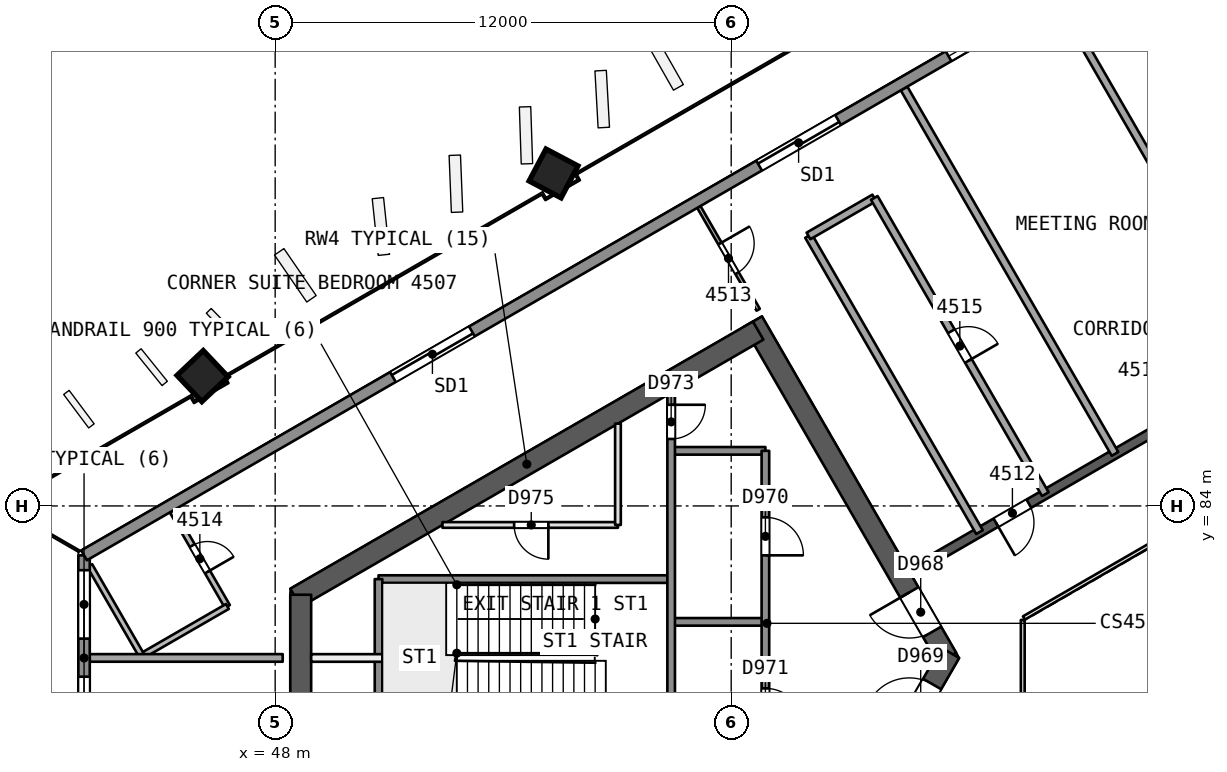
"""IFC4 building model, lengths in metres.
Left out: names, types, materials, properties, quantities, classifications, styles, units other than length and angle.
Written with IfcOpenShell. Run it as: python <this file> out.ifc"""

import sys

from ifc_helpers import new_model, si_unit, direction, frame, frame_2d, origin, origin_2d, place, context, subcontext, project, spatial, rectangle, extrude, element, fill, save


model = new_model("IFC4")
c1 = context("Model", 3, precision=1e-05, world=origin(), true_north=direction((0.0, 1.0)))
c2 = subcontext(c1, "Body", "Model", "MODEL_VIEW")
j1 = project(units=[si_unit("LENGTHUNIT", "METRE"), si_unit("PLANEANGLEUNIT", "RADIAN")], contexts=[c1])
p1 = place(None, origin())
s1 = spatial("IfcSite", under=j1, at=p1, CompositionType="ELEMENT")
p2 = place(p1, origin())
s2 = spatial("IfcBuilding", under=s1, at=p2, CompositionType="ELEMENT")
p3 = place(p2, frame((0.0, 0.0, 185.9)))
s3 = spatial("IfcBuildingStorey", under=s2, at=p3, CompositionType="ELEMENT", Elevation=185.9)
p4 = place(p3, frame((65.682, 80.0, 0.0), z_axis=(0.0, 0.0, 1.0), x_axis=(-0.500000202252, 0.866025287014, 0.0)))
e1 = element("IfcWall", 1, at=p4, inside=s3, PredefinedType="SHEAR", context=c2, shape_type="SweptSolid", body=[
    extrude(rectangle(XDim=10.221, YDim=0.55, at=frame_2d((5.111, 0.0))), origin(), (0.0, 0.0, 1.0), 3.7),
])
p5 = place(p4, frame((0.791, 0.0, 0.0)))
e2 = element("IfcOpeningElement", 2, at=p5, cuts=e1, PredefinedType="OPENING", context=c2, shape_type="SweptSolid", body=[
    extrude(rectangle(XDim=1.2, YDim=2.1, at=frame_2d((0.6, 1.05))), frame((0.0, 0.286, 0.0), z_axis=(0.0, -1.0, 0.0), x_axis=(1.0, 0.0, 0.0)), (0.0, 0.0, 1.0), 0.571),
])
p6 = place(p3, frame((60.709, 88.614, 0.0), z_axis=(0.0, 0.0, 1.0), x_axis=(-0.866020164116, -0.500009075263, 0.0)))
e3 = element("IfcWall", 3, at=p6, inside=s3, PredefinedType="SHEAR", context=c2, shape_type="SweptSolid", body=[
    extrude(rectangle(XDim=14.058, YDim=0.55, at=frame_2d((7.029, 0.0))), origin(), (0.0, 0.0, 1.0), 3.7),
])
p7 = place(p3, frame((48.672, 81.664, 0.0), z_axis=(0.0, 0.0, 1.0), x_axis=(0.0, -1.0, 0.0)))
e4 = element("IfcWall", 4, at=p7, inside=s3, PredefinedType="SHEAR", context=c2, shape_type="SweptSolid", body=[
    extrude(rectangle(XDim=3.487, YDim=0.55, at=frame_2d((1.743, 0.0))), origin(), (0.0, 0.0, 1.0), 3.7),
])
p8 = place(p3, frame((60.709, 71.386, 0.0), z_axis=(0.0, 0.0, 1.0), x_axis=(0.500015938302, 0.866016201606, 0.0)))
e5 = element("IfcWall", 5, at=p8, inside=s3, PredefinedType="SHEAR", context=c2, shape_type="SweptSolid", body=[
    extrude(rectangle(XDim=10.105, YDim=0.55, at=frame_2d((5.053, 0.0))), origin(), (0.0, 0.0, 1.0), 3.7),
])
p9 = place(p8, frame((7.955, 0.0, 0.0)))
e6 = element("IfcOpeningElement", 6, at=p9, cuts=e5, PredefinedType="OPENING", context=c2, shape_type="SweptSolid", body=[
    extrude(rectangle(XDim=1.2, YDim=2.1, at=frame_2d((0.6, 1.05))), frame((0.0, 0.286, 0.0), z_axis=(0.0, -1.0, 0.0), x_axis=(1.0, 0.0, 0.0)), (0.0, 0.0, 1.0), 0.571),
])
p10 = place(p3, frame((78.2, 90.046, 0.0), z_axis=(0.0, 0.0, 1.0), x_axis=(-0.866026492143, -0.499998114903, 0.0)))
e7 = element("IfcWall", 7, at=p10, inside=s3, PredefinedType="SHEAR", context=c2, shape_type="SweptSolid", body=[
    extrude(rectangle(XDim=15.588, YDim=0.25, at=frame_2d((7.794, 0.0))), origin(), (0.0, 0.0, 1.0), 3.25),
])
p11 = place(p10, frame((3.138, 0.0, 0.0)))
e8 = element("IfcOpeningElement", 8, at=p11, cuts=e7, PredefinedType="OPENING", context=c2, shape_type="SweptSolid", body=[
    extrude(rectangle(XDim=1.0, YDim=2.1, at=frame_2d((0.5, 1.05))), frame((0.0, 0.135, 0.0), z_axis=(0.0, -1.0, 0.0), x_axis=(1.0, 0.0, 0.0)), (0.0, 0.0, 1.0), 0.271),
])
p12 = place(p10, frame((6.415, 0.0, 0.0)))
e9 = element("IfcOpeningElement", 9, at=p12, cuts=e7, PredefinedType="OPENING", context=c2, shape_type="SweptSolid", body=[
    extrude(rectangle(XDim=1.2, YDim=2.4, at=frame_2d((0.6, 1.2))), frame((0.0, 0.135, 0.0), z_axis=(0.0, -1.0, 0.0), x_axis=(1.0, 0.0, 0.0)), (0.0, 0.0, 1.0), 0.271),
])
p13 = place(p10, frame((11.971, 0.0, 0.0)))
e10 = element("IfcOpeningElement", 10, at=p13, cuts=e7, PredefinedType="OPENING", context=c2, shape_type="SweptSolid", body=[
    extrude(rectangle(XDim=1.0, YDim=2.1, at=frame_2d((0.5, 1.05))), frame((0.0, 0.135, 0.0), z_axis=(0.0, -1.0, 0.0), x_axis=(1.0, 0.0, 0.0)), (0.0, 0.0, 1.0), 0.271),
])
p14 = place(p3, frame((55.302, 92.763, 0.0), z_axis=(0.019327242333, -0.012137244332, 0.999739538582), x_axis=(-0.500214328423, 0.865666448646, 0.020179824807)))
e11 = element("IfcColumn", 11, at=p14, inside=s3, PredefinedType="COLUMN", context=c2, shape_type="SweptSolid", body=[
    extrude(rectangle(XDim=0.95, YDim=0.95, at=origin_2d()), origin(), (0.0, 0.0, 1.0), 3.701),
])
p15 = place(p3, frame((46.055, 87.425, 0.0), z_axis=(0.028557219273, -0.006859008786, 0.999568626571), x_axis=(-0.498515256127, 0.866645794777, 0.020189249707)))
e12 = element("IfcColumn", 12, at=p15, inside=s3, PredefinedType="COLUMN", context=c2, shape_type="SweptSolid", body=[
    extrude(rectangle(XDim=0.95, YDim=0.95, at=origin_2d()), origin(), (0.0, 0.0, 1.0), 3.702),
])
for number, where, z_axis, x_axis in (
    (13, (68.598, 97.323, 0.0), (0.0, 0.0, 1.0), (0.5, -0.866, 0.0)),
    (14, (64.548, 94.985, 0.0), (0.0, 0.0, 1.0), (0.5, -0.866, 0.0)),
):
    element("IfcWall", number, at=place(p3, frame(where, z_axis=z_axis, x_axis=x_axis)), inside=s3, PredefinedType="PARTITIONING", context=c2, shape_type="SweptSolid", body=[
        extrude(rectangle(XDim=11.104, YDim=0.2, at=frame_2d((5.552, 0.0))), origin(), (0.0, 0.0, 1.0), 3.25),
    ])
p16 = place(p3, frame((59.148, 91.868, 0.0), z_axis=(0.0, 0.0, 1.0), x_axis=(0.4999794672, -0.866037258078, 0.0)))
e15 = element("IfcWall", 15, at=p16, inside=s3, PredefinedType="PARTITIONING", context=c2, shape_type="SweptSolid", body=[
    extrude(rectangle(XDim=3.125, YDim=0.1, at=frame_2d((1.562, 0.0))), origin(), (0.0, 0.0, 1.0), 3.25),
])
p17 = place(p16, frame((1.112, 0.0, 0.0)))
e16 = element("IfcOpeningElement", 16, at=p17, cuts=e15, PredefinedType="OPENING", context=c2, shape_type="SweptSolid", body=[
    extrude(rectangle(XDim=0.9, YDim=2.1, at=frame_2d((0.45, 1.05))), frame((0.0, 0.061, 0.0), z_axis=(0.0, -1.0, 0.0), x_axis=(1.0, 0.0, 0.0)), (0.0, 0.0, 1.0), 0.121),
])
p18 = place(p3, frame((66.534, 83.311, 0.0), z_axis=(0.0, 0.0, 1.0), x_axis=(-0.5000018851, 0.866024315419, 0.0)))
e17 = element("IfcWall", 17, at=p18, inside=s3, PredefinedType="PARTITIONING", context=c2, shape_type="SweptSolid", body=[
    extrude(rectangle(XDim=9.0, YDim=0.2, at=frame_2d((4.5, 0.0))), origin(), (0.0, 0.0, 1.0), 3.25),
])
p19 = place(p3, frame((62.034, 91.105, 0.0), z_axis=(0.0, 0.0, 1.0), x_axis=(0.866041268327, 0.499972520799, 0.0)))
e18 = element("IfcWall", 18, at=p19, inside=s3, PredefinedType="PARTITIONING", context=c2, shape_type="SweptSolid", body=[
    extrude(rectangle(XDim=2.0, YDim=0.2, at=frame_2d((1.0, 0.0))), origin(), (0.0, 0.0, 1.0), 3.25),
])
p20 = place(p3, frame((63.766, 92.105, 0.0), z_axis=(0.0, 0.0, 1.0), x_axis=(0.5000018851, -0.866024315419, 0.0)))
e19 = element("IfcWall", 19, at=p20, inside=s3, PredefinedType="PARTITIONING", context=c2, shape_type="SweptSolid", body=[
    extrude(rectangle(XDim=9.0, YDim=0.2, at=frame_2d((4.5, 0.0))), origin(), (0.0, 0.0, 1.0), 3.25),
])
p21 = place(p20, frame((4.05, 0.0, 0.0)))
e20 = element("IfcOpeningElement", 20, at=p21, cuts=e19, PredefinedType="OPENING", context=c2, shape_type="SweptSolid", body=[
    extrude(rectangle(XDim=0.9, YDim=2.1, at=frame_2d((0.45, 1.05))), frame((0.0, 0.11, 0.0), z_axis=(0.0, -1.0, 0.0), x_axis=(1.0, 0.0, 0.0)), (0.0, 0.0, 1.0), 0.221),
])
p22 = place(p3, frame((45.293, 83.866, 0.0), z_axis=(0.0, 0.0, 1.0), x_axis=(0.50005036918, -0.865996321171, 0.0)))
e21 = element("IfcWall", 21, at=p22, inside=s3, PredefinedType="PARTITIONING", context=c2, shape_type="SweptSolid", body=[
    extrude(rectangle(XDim=2.9, YDim=0.15, at=frame_2d((1.45, 0.0))), origin(), (0.0, 0.0, 1.0), 3.25),
])
p23 = place(p22, frame((1.05, 0.0, 0.0)))
e22 = element("IfcOpeningElement", 22, at=p23, cuts=e21, PredefinedType="OPENING", context=c2, shape_type="SweptSolid", body=[
    extrude(rectangle(XDim=0.8, YDim=2.1, at=frame_2d((0.4, 1.05))), frame((0.0, 0.085, 0.0), z_axis=(0.0, -1.0, 0.0), x_axis=(1.0, 0.0, 0.0)), (0.0, 0.0, 1.0), 0.171),
])
p24 = place(p3, frame((46.743, 81.354, 0.0), z_axis=(0.0, 0.0, 1.0), x_axis=(-0.866021400173, -0.500006934395, 0.0)))
e23 = element("IfcWall", 23, at=p24, inside=s3, PredefinedType="PARTITIONING", context=c2, shape_type="SweptSolid", body=[
    extrude(rectangle(XDim=2.6, YDim=0.15, at=frame_2d((1.3, 0.0))), origin(), (0.0, 0.0, 1.0), 3.25),
])
p25 = place(p3, frame((44.491, 80.054, 0.0), z_axis=(0.0, 0.0, 1.0), x_axis=(-0.500035825175, 0.866004719122, 0.0)))
e24 = element("IfcWall", 24, at=p25, inside=s3, PredefinedType="PARTITIONING", context=c2, shape_type="SweptSolid", body=[
    extrude(rectangle(XDim=2.742, YDim=0.15, at=frame_2d((1.371, 0.0))), origin(), (0.0, 0.0, 1.0), 3.25),
])
p26 = place(p3, frame((43.12, 80.001, 0.0), z_axis=(0.0, 0.0, 1.0), x_axis=(1.0, 0.0, 0.0)))
e25 = element("IfcWall", 25, at=p26, inside=s3, PredefinedType="PARTITIONING", context=c2, shape_type="SweptSolid", body=[
    extrude(rectangle(XDim=5.078, YDim=0.2, at=frame_2d((2.539, 0.0))), origin(), (0.0, 0.0, 1.0), 3.25),
])
p27 = place(p3, frame((42.971, 77.3, 0.0), z_axis=(0.0, 0.0, 1.0), x_axis=(0.0, 1.0, 0.0)))
e26 = element("IfcWall", 26, at=p27, inside=s3, PredefinedType="SOLIDWALL", context=c2, shape_type="SweptSolid", body=[
    extrude(rectangle(XDim=5.399, YDim=0.3, at=frame_2d((2.7, 0.0))), origin(), (0.0, 0.0, 1.0), 3.25),
])
p28 = place(p27, frame((3.209, 0.0, 0.9)))
e27 = element("IfcOpeningElement", 27, at=p28, cuts=e26, PredefinedType="OPENING", context=c2, shape_type="SweptSolid", body=[
    extrude(rectangle(XDim=1.8, YDim=1.5, at=frame_2d((0.9, 0.75))), frame((0.0, 0.161, 0.0), z_axis=(0.0, -1.0, 0.0), x_axis=(1.0, 0.0, 0.0)), (0.0, 0.0, 1.0), 0.321),
])
p29 = place(p27, frame((0.407, 0.0, 0.9)))
e28 = element("IfcOpeningElement", 28, at=p29, cuts=e26, PredefinedType="OPENING", context=c2, shape_type="SweptSolid", body=[
    extrude(rectangle(XDim=1.8, YDim=1.5, at=frame_2d((0.9, 0.75))), frame((0.0, 0.161, 0.0), z_axis=(0.0, -1.0, 0.0), x_axis=(1.0, 0.0, 0.0)), (0.0, 0.0, 1.0), 0.321),
])
p30 = place(p3, frame((42.971, 82.7, 0.0), z_axis=(0.0, 0.0, 1.0), x_axis=(0.866024890781, 0.500000888547, 0.0)))
e29 = element("IfcWall", 29, at=p30, inside=s3, PredefinedType="SOLIDWALL", context=c2, shape_type="SweptSolid", body=[
    extrude(rectangle(XDim=52.776, YDim=0.3, at=frame_2d((26.388, 0.0))), origin(), (0.0, 0.0, 1.0), 3.25),
])
p31 = place(p30, frame((20.511, 0.0, 0.0)))
e30 = element("IfcOpeningElement", 30, at=p31, cuts=e29, PredefinedType="OPENING", context=c2, shape_type="SweptSolid", body=[
    extrude(rectangle(XDim=2.4, YDim=2.4, at=frame_2d((1.2, 1.2))), frame((0.0, 0.161, 0.0), z_axis=(0.0, -1.0, 0.0), x_axis=(1.0, 0.0, 0.0)), (0.0, 0.0, 1.0), 0.321),
])
p32 = place(p30, frame((9.385, 0.0, 0.0)))
e31 = element("IfcOpeningElement", 31, at=p32, cuts=e29, PredefinedType="OPENING", context=c2, shape_type="SweptSolid", body=[
    extrude(rectangle(XDim=2.4, YDim=2.4, at=frame_2d((1.2, 1.2))), frame((0.0, 0.161, 0.0), z_axis=(0.0, -1.0, 0.0), x_axis=(1.0, 0.0, 0.0)), (0.0, 0.0, 1.0), 0.321),
])
p33 = place(p30, frame((39.984, 0.0, 0.0)))
e32 = element("IfcOpeningElement", 32, at=p33, cuts=e29, PredefinedType="OPENING", context=c2, shape_type="SweptSolid", body=[
    extrude(rectangle(XDim=2.4, YDim=2.4, at=frame_2d((1.2, 1.2))), frame((0.0, 0.161, 0.0), z_axis=(0.0, -1.0, 0.0), x_axis=(1.0, 0.0, 0.0)), (0.0, 0.0, 1.0), 0.321),
])
p34 = place(p30, frame((26.268, 0.0, 0.9)))
e33 = element("IfcOpeningElement", 33, at=p34, cuts=e29, PredefinedType="OPENING", context=c2, shape_type="SweptSolid", body=[
    extrude(rectangle(XDim=1.8, YDim=1.5, at=frame_2d((0.9, 0.75))), frame((0.0, 0.161, 0.0), z_axis=(0.0, -1.0, 0.0), x_axis=(1.0, 0.0, 0.0)), (0.0, 0.0, 1.0), 0.321),
])
p35 = place(p3, frame((60.9, 85.45, 0.0), z_axis=(0.0, 0.0, 1.0), x_axis=(-1.0, 0.0, 0.0)))
e34 = element("IfcWall", 34, at=p35, inside=s3, PredefinedType="SOLIDWALL", context=c2, shape_type="SweptSolid", body=[
    extrude(rectangle(XDim=2.48, YDim=0.2, at=frame_2d((1.24, 0.0))), origin(), (0.0, 0.0, 1.0), 3.25),
])
p36 = place(p3, frame((57.02, 83.5, 0.0), z_axis=(0.0, 0.0, 1.0), x_axis=(-1.0, 0.0, 0.0)))
e35 = element("IfcWall", 35, at=p36, inside=s3, PredefinedType="PARTITIONING", context=c2, shape_type="SweptSolid", body=[
    extrude(rectangle(XDim=4.618, YDim=0.15, at=frame_2d((2.309, 0.0))), origin(), (0.0, 0.0, 1.0), 3.25),
])
p37 = place(p36, frame((1.832, 0.0, 0.0)))
e36 = element("IfcOpeningElement", 36, at=p37, cuts=e35, PredefinedType="OPENING", context=c2, shape_type="SweptSolid", body=[
    extrude(rectangle(XDim=0.9, YDim=2.1, at=frame_2d((0.45, 1.05))), frame((0.0, 0.085, 0.0), z_axis=(0.0, -1.0, 0.0), x_axis=(1.0, 0.0, 0.0)), (0.0, 0.0, 1.0), 0.171),
])
p38 = place(p3, frame((58.42, 82.075, 0.0), z_axis=(0.0, 0.0, 1.0), x_axis=(-1.0, 0.0, 0.0)))
e37 = element("IfcWall", 37, at=p38, inside=s3, PredefinedType="SOLIDWALL", context=c2, shape_type="SweptSolid", body=[
    extrude(rectangle(XDim=7.7, YDim=0.2, at=frame_2d((3.85, 0.0))), origin(), (0.0, 0.0, 1.0), 3.25),
])
p39 = place(p3, frame((60.9, 80.95, 0.0), z_axis=(0.0, 0.0, 1.0), x_axis=(-1.0, 0.0, 0.0)))
e38 = element("IfcWall", 38, at=p39, inside=s3, PredefinedType="SOLIDWALL", context=c2, shape_type="SweptSolid", body=[
    extrude(rectangle(XDim=2.48, YDim=0.2, at=frame_2d((1.24, 0.0))), origin(), (0.0, 0.0, 1.0), 3.25),
])
p40 = place(p3, frame((50.82, 80.0, 0.0), z_axis=(0.0, 0.0, 1.0), x_axis=(-1.0, 0.0, 0.0)))
e39 = element("IfcWall", 39, at=p40, inside=s3, PredefinedType="PARTITIONING", context=c2, shape_type="SweptSolid", body=[
    extrude(rectangle(XDim=1.873, YDim=0.2, at=frame_2d((0.937, 0.0))), origin(), (0.0, 0.0, 1.0), 3.25),
])
p41 = place(p3, frame((60.9, 85.45, 0.0), z_axis=(0.0, 0.0, 1.0), x_axis=(0.0, -1.0, 0.0)))
e40 = element("IfcWall", 40, at=p41, inside=s3, PredefinedType="SOLIDWALL", context=c2, shape_type="SweptSolid", body=[
    extrude(rectangle(XDim=10.9, YDim=0.2, at=frame_2d((5.45, 0.0))), origin(), (0.0, 0.0, 1.0), 3.25),
])
p42 = place(p41, frame((1.75, 0.0, 0.0)))
e41 = element("IfcOpeningElement", 41, at=p42, cuts=e40, PredefinedType="OPENING", context=c2, shape_type="SweptSolid", body=[
    extrude(rectangle(XDim=1.0, YDim=2.1, at=frame_2d((0.5, 1.05))), frame((0.0, 0.11, 0.0), z_axis=(0.0, -1.0, 0.0), x_axis=(1.0, 0.0, 0.0)), (0.0, 0.0, 1.0), 0.221),
])
p43 = place(p41, frame((6.25, 0.0, 0.0)))
e42 = element("IfcOpeningElement", 42, at=p43, cuts=e40, PredefinedType="OPENING", context=c2, shape_type="SweptSolid", body=[
    extrude(rectangle(XDim=1.0, YDim=2.1, at=frame_2d((0.5, 1.05))), frame((0.0, 0.11, 0.0), z_axis=(0.0, -1.0, 0.0), x_axis=(1.0, 0.0, 0.0)), (0.0, 0.0, 1.0), 0.221),
])
p44 = place(p3, frame((58.42, 86.974, 0.0), z_axis=(0.0, 0.0, 1.0), x_axis=(0.0, -1.0, 0.0)))
e43 = element("IfcWall", 43, at=p44, inside=s3, PredefinedType="SOLIDWALL", context=c2, shape_type="SweptSolid", body=[
    extrude(rectangle(XDim=10.524, YDim=0.2, at=frame_2d((5.262, 0.0))), origin(), (0.0, 0.0, 1.0), 3.25),
])
p45 = place(p44, frame((0.312, 0.0, 0.0)))
e44 = element("IfcOpeningElement", 44, at=p45, cuts=e43, PredefinedType="OPENING", context=c2, shape_type="SweptSolid", body=[
    extrude(rectangle(XDim=0.9, YDim=2.1, at=frame_2d((0.45, 1.05))), frame((0.0, 0.11, 0.0), z_axis=(0.0, -1.0, 0.0), x_axis=(1.0, 0.0, 0.0)), (0.0, 0.0, 1.0), 0.221),
])
p46 = place(p3, frame((57.02, 86.166, 0.0), z_axis=(0.0, 0.0, 1.0), x_axis=(0.0, -1.0, 0.0)))
e45 = element("IfcWall", 45, at=p46, inside=s3, PredefinedType="PARTITIONING", context=c2, shape_type="SweptSolid", body=[
    extrude(rectangle(XDim=2.666, YDim=0.15, at=frame_2d((1.333, 0.0))), origin(), (0.0, 0.0, 1.0), 3.25),
])
p47 = place(p3, frame((50.72, 82.075, 0.0), z_axis=(0.0, 0.0, 1.0), x_axis=(0.0, -1.0, 0.0)))
e46 = element("IfcWall", 46, at=p47, inside=s3, PredefinedType="SOLIDWALL", context=c2, shape_type="SweptSolid", body=[
    extrude(rectangle(XDim=4.15, YDim=0.2, at=frame_2d((2.075, 0.0))), origin(), (0.0, 0.0, 1.0), 3.25),
])
p48 = place(p3, frame((77.738, 86.846, 0.0), z_axis=(0.0, 0.0, 1.0), x_axis=(-0.866026658274, -0.499997827154, 0.0)))
e47 = element("IfcWall", 47, at=p48, inside=s3, PredefinedType="PARTITIONING", context=c2, shape_type="SweptSolid", body=[
    extrude(rectangle(XDim=11.588, YDim=0.1, at=frame_2d((5.794, 0.0))), origin(), (0.0, 0.0, 1.0), 3.25),
])
p49 = place(p3, frame((67.672, 81.0, 0.0), z_axis=(0.0, 0.0, 1.0), x_axis=(0.0, -1.0, 0.0)))
e48 = element("IfcWall", 48, at=p49, inside=s3, PredefinedType="PARTITIONING", context=c2, shape_type="SweptSolid", body=[
    extrude(rectangle(XDim=2.0, YDim=0.1, at=frame_2d((1.0, 0.0))), origin(), (0.0, 0.0, 1.0), 3.25),
])
p50 = place(p13, origin())
e49 = element("IfcDoor", 49, at=p50, inside=s3, OperationType="SINGLE_SWING_RIGHT", PredefinedType="NOTDEFINED", context=c2, shape_type="SweptSolid", body=[
    extrude(rectangle(XDim=1.0, YDim=2.1, at=frame_2d((0.5, 1.05))), frame((0.0, 0.025, 0.0), z_axis=(0.0, -1.0, 0.0), x_axis=(1.0, 0.0, 0.0)), (0.0, 0.0, 1.0), 0.05),
])
fill(e10, e49)
p51 = place(p17, origin())
e50 = element("IfcDoor", 50, at=p51, inside=s3, OperationType="SINGLE_SWING_LEFT", PredefinedType="NOTDEFINED", context=c2, shape_type="SweptSolid", body=[
    extrude(rectangle(XDim=0.9, YDim=2.1, at=frame_2d((0.45, 1.05))), frame((0.0, 0.025, 0.0), z_axis=(0.0, -1.0, 0.0), x_axis=(1.0, 0.0, 0.0)), (0.0, 0.0, 1.0), 0.05),
])
fill(e16, e50)
p52 = place(p23, origin())
e51 = element("IfcDoor", 51, at=p52, inside=s3, OperationType="SINGLE_SWING_RIGHT", PredefinedType="NOTDEFINED", context=c2, shape_type="SweptSolid", body=[
    extrude(rectangle(XDim=0.8, YDim=2.1, at=frame_2d((0.4, 1.05))), frame((0.0, 0.025, 0.0), z_axis=(0.0, -1.0, 0.0), x_axis=(1.0, 0.0, 0.0)), (0.0, 0.0, 1.0), 0.05),
])
fill(e22, e51)
p53 = place(p21, origin())
e52 = element("IfcDoor", 52, at=p53, inside=s3, OperationType="SINGLE_SWING_RIGHT", PredefinedType="NOTDEFINED", context=c2, shape_type="SweptSolid", body=[
    extrude(rectangle(XDim=0.9, YDim=2.1, at=frame_2d((0.45, 1.05))), frame((0.0, 0.025, 0.0), z_axis=(0.0, -1.0, 0.0), x_axis=(1.0, 0.0, 0.0)), (0.0, 0.0, 1.0), 0.05),
])
fill(e20, e52)
p54 = place(p28, origin())
e53 = element("IfcWindow", 53, at=p54, inside=s3, PartitioningType="SINGLE_PANEL", PredefinedType="WINDOW", context=c2, shape_type="SweptSolid", body=[
    extrude(rectangle(XDim=1.8, YDim=1.5, at=frame_2d((0.9, 0.75))), frame((0.0, 0.03, 0.0), z_axis=(0.0, -1.0, 0.0), x_axis=(1.0, 0.0, 0.0)), (0.0, 0.0, 1.0), 0.06),
])
fill(e27, e53)
p55 = place(p29, origin())
e54 = element("IfcWindow", 54, at=p55, inside=s3, PartitioningType="SINGLE_PANEL", PredefinedType="WINDOW", context=c2, shape_type="SweptSolid", body=[
    extrude(rectangle(XDim=1.8, YDim=1.5, at=frame_2d((0.9, 0.75))), frame((0.0, 0.03, 0.0), z_axis=(0.0, -1.0, 0.0), x_axis=(1.0, 0.0, 0.0)), (0.0, 0.0, 1.0), 0.06),
])
fill(e28, e54)
p56 = place(p31, origin())
e55 = element("IfcDoor", 55, at=p56, inside=s3, OperationType="SLIDING_TO_LEFT", PredefinedType="NOTDEFINED", context=c2, shape_type="SweptSolid", body=[
    extrude(rectangle(XDim=2.4, YDim=2.4, at=frame_2d((1.2, 1.2))), frame((0.0, 0.025, 0.0), z_axis=(0.0, -1.0, 0.0), x_axis=(1.0, 0.0, 0.0)), (0.0, 0.0, 1.0), 0.05),
])
fill(e30, e55)
p57 = place(p32, origin())
e56 = element("IfcDoor", 56, at=p57, inside=s3, OperationType="SLIDING_TO_RIGHT", PredefinedType="NOTDEFINED", context=c2, shape_type="SweptSolid", body=[
    extrude(rectangle(XDim=2.4, YDim=2.4, at=frame_2d((1.2, 1.2))), frame((0.0, 0.025, 0.0), z_axis=(0.0, -1.0, 0.0), x_axis=(1.0, 0.0, 0.0)), (0.0, 0.0, 1.0), 0.05),
])
fill(e31, e56)
p58 = place(p34, origin())
e57 = element("IfcWindow", 57, at=p58, inside=s3, PartitioningType="SINGLE_PANEL", PredefinedType="WINDOW", context=c2, shape_type="SweptSolid", body=[
    extrude(rectangle(XDim=1.8, YDim=1.5, at=frame_2d((0.9, 0.75))), frame((0.0, 0.03, 0.0), z_axis=(0.0, -1.0, 0.0), x_axis=(1.0, 0.0, 0.0)), (0.0, 0.0, 1.0), 0.06),
])
fill(e33, e57)
p59 = place(p5, origin())
e58 = element("IfcDoor", 58, at=p59, inside=s3, OperationType="SINGLE_SWING_RIGHT", PredefinedType="NOTDEFINED", context=c2, shape_type="SweptSolid", body=[
    extrude(rectangle(XDim=1.2, YDim=2.1, at=frame_2d((0.6, 1.05))), frame((0.0, 0.025, 0.0), z_axis=(0.0, -1.0, 0.0), x_axis=(1.0, 0.0, 0.0)), (0.0, 0.0, 1.0), 0.05),
])
fill(e2, e58)
p60 = place(p9, origin())
e59 = element("IfcDoor", 59, at=p60, inside=s3, OperationType="SINGLE_SWING_LEFT", PredefinedType="NOTDEFINED", context=c2, shape_type="SweptSolid", body=[
    extrude(rectangle(XDim=1.2, YDim=2.1, at=frame_2d((0.6, 1.05))), frame((0.0, 0.025, 0.0), z_axis=(0.0, -1.0, 0.0), x_axis=(1.0, 0.0, 0.0)), (0.0, 0.0, 1.0), 0.05),
])
fill(e6, e59)
p61 = place(p42, origin())
e60 = element("IfcDoor", 60, at=p61, inside=s3, OperationType="SINGLE_SWING_RIGHT", PredefinedType="NOTDEFINED", context=c2, shape_type="SweptSolid", body=[
    extrude(rectangle(XDim=1.0, YDim=2.1, at=frame_2d((0.5, 1.05))), frame((0.0, 0.025, 0.0), z_axis=(0.0, -1.0, 0.0), x_axis=(1.0, 0.0, 0.0)), (0.0, 0.0, 1.0), 0.05),
])
fill(e41, e60)
p62 = place(p43, origin())
e61 = element("IfcDoor", 61, at=p62, inside=s3, OperationType="SINGLE_SWING_RIGHT", PredefinedType="NOTDEFINED", context=c2, shape_type="SweptSolid", body=[
    extrude(rectangle(XDim=1.0, YDim=2.1, at=frame_2d((0.5, 1.05))), frame((0.0, 0.025, 0.0), z_axis=(0.0, -1.0, 0.0), x_axis=(1.0, 0.0, 0.0)), (0.0, 0.0, 1.0), 0.05),
])
fill(e42, e61)
p63 = place(p45, origin())
e62 = element("IfcDoor", 62, at=p63, inside=s3, OperationType="SINGLE_SWING_LEFT", PredefinedType="NOTDEFINED", context=c2, shape_type="SweptSolid", body=[
    extrude(rectangle(XDim=0.9, YDim=2.1, at=frame_2d((0.45, 1.05))), frame((0.0, 0.025, 0.0), z_axis=(0.0, -1.0, 0.0), x_axis=(1.0, 0.0, 0.0)), (0.0, 0.0, 1.0), 0.05),
])
fill(e44, e62)
p64 = place(p37, origin())
e63 = element("IfcDoor", 63, at=p64, inside=s3, OperationType="SINGLE_SWING_LEFT", PredefinedType="NOTDEFINED", context=c2, shape_type="SweptSolid", body=[
    extrude(rectangle(XDim=0.9, YDim=2.1, at=frame_2d((0.45, 1.05))), frame((0.0, 0.025, 0.0), z_axis=(0.0, -1.0, 0.0), x_axis=(1.0, 0.0, 0.0)), (0.0, 0.0, 1.0), 0.05),
])
fill(e36, e63)
save(model, sys.argv[1])
